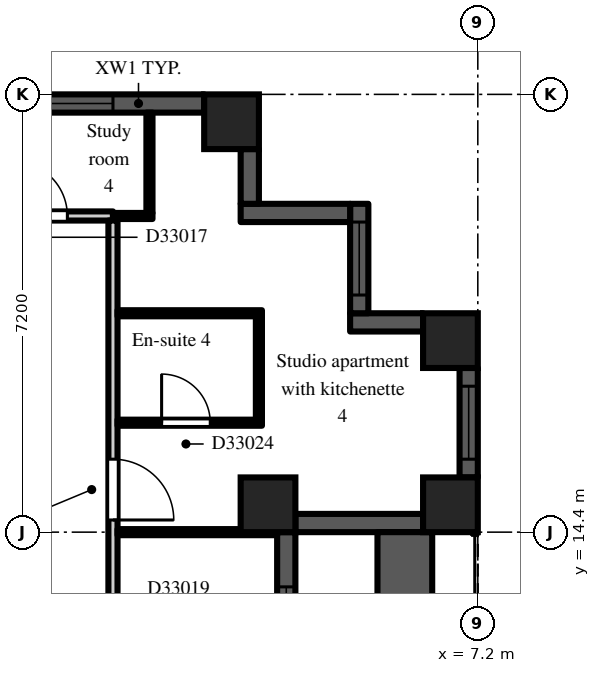
"""IFC4 building model, lengths in metres.
Left out: names, types, materials, properties, quantities, classifications, styles, units other than length and angle.
Written with IfcOpenShell. Run it as: python <this file> out.ifc"""

import sys

from ifc_helpers import new_model, si_unit, direction, frame, frame_2d, origin, origin_2d, place, context, subcontext, project, spatial, rectangle, extrude, element, fill, save


model = new_model("IFC4")
c1 = context("Model", 3, precision=1e-05, world=origin(), true_north=direction((0.0, 1.0)))
c2 = subcontext(c1, "Body", "Model", "MODEL_VIEW")
j1 = project(units=[si_unit("LENGTHUNIT", "METRE"), si_unit("PLANEANGLEUNIT", "RADIAN")], contexts=[c1])
p1 = place(None, origin())
s1 = spatial("IfcSite", under=j1, at=p1, CompositionType="ELEMENT")
p2 = place(p1, origin())
s2 = spatial("IfcBuilding", under=s1, at=p2, CompositionType="ELEMENT")
p3 = place(p2, frame((0.0, 0.0, 231.9)))
s3 = spatial("IfcBuildingStorey", under=s2, at=p3, CompositionType="ELEMENT", Elevation=231.9)
for number, where, z_axis, x_axis in (
    (1, (3.15, 21.15, 0.0), (0.0, 0.0, 1.0), (1.0, 0.0, 0.0)),
    (2, (3.75, 14.85, 0.0), (0.0, 0.0, 1.0), (1.0, 0.0, 0.0)),
    (3, (6.75, 14.85, 0.0), (0.0, 0.0, 1.0), (1.0, 0.0, 0.0)),
    (4, (6.75, 17.55, 0.0), (0.0, 0.0, 1.0), (1.0, 0.0, 0.0)),
):
    element("IfcColumn", number, at=place(p3, frame(where, z_axis=z_axis, x_axis=x_axis)), inside=s3, PredefinedType="COLUMN", context=c2, shape_type="SweptSolid", body=[
        extrude(rectangle(XDim=0.9, YDim=0.9, at=origin_2d()), origin(), (0.0, 0.0, 1.0), 3.0),
    ])
p4 = place(p3, frame((4.05, 7.2, 0.0), z_axis=(0.0, 0.0, 1.0), x_axis=(0.0, 1.0, 0.0)))
e5 = element("IfcWall", 5, at=p4, inside=s3, PredefinedType="SOLIDWALL", context=c2, shape_type="SweptSolid", body=[
    extrude(rectangle(XDim=7.2, YDim=0.3, at=frame_2d((3.6, 0.0))), origin(), (0.0, 0.0, 1.0), 2.3),
])
p5 = place(p4, frame((3.0, 0.0, 0.0)))
e6 = element("IfcOpeningElement", 6, at=p5, cuts=e5, PredefinedType="OPENING", context=c2, shape_type="SweptSolid", body=[
    extrude(rectangle(XDim=1.2, YDim=2.05, at=frame_2d((0.6, 1.025))), frame((0.0, 0.16, 0.0), z_axis=(0.0, -1.0, 0.0), x_axis=(1.0, 0.0, 0.0)), (0.0, 0.0, 1.0), 0.32),
])
p6 = place(p4, frame((0.9, 0.0, 0.2)))
e7 = element("IfcOpeningElement", 7, at=p6, cuts=e5, PredefinedType="OPENING", context=c2, shape_type="SweptSolid", body=[
    extrude(rectangle(XDim=1.8, YDim=1.85, at=frame_2d((0.9, 0.925))), frame((0.0, 0.16, 0.0), z_axis=(0.0, -1.0, 0.0), x_axis=(1.0, 0.0, 0.0)), (0.0, 0.0, 1.0), 0.32),
])
p7 = place(p4, frame((4.5, 0.0, 0.2)))
e8 = element("IfcOpeningElement", 8, at=p7, cuts=e5, PredefinedType="OPENING", context=c2, shape_type="SweptSolid", body=[
    extrude(rectangle(XDim=1.8, YDim=1.85, at=frame_2d((0.9, 0.925))), frame((0.0, 0.16, 0.0), z_axis=(0.0, -1.0, 0.0), x_axis=(1.0, 0.0, 0.0)), (0.0, 0.0, 1.0), 0.32),
])
p8 = place(p3, frame((4.2, 14.55, 0.0), z_axis=(0.0, 0.0, 1.0), x_axis=(1.0, 0.0, 0.0)))
e9 = element("IfcWall", 9, at=p8, inside=s3, PredefinedType="SOLIDWALL", context=c2, shape_type="SweptSolid", body=[
    extrude(rectangle(XDim=2.1, YDim=0.3, at=frame_2d((1.05, 0.0))), origin(), (0.0, 0.0, 1.0), 2.3),
])
p9 = place(p3, frame((7.05, 15.3, 0.0), z_axis=(0.0, 0.0, 1.0), x_axis=(0.0, 1.0, 0.0)))
e10 = element("IfcWall", 10, at=p9, inside=s3, PredefinedType="SOLIDWALL", context=c2, shape_type="SweptSolid", body=[
    extrude(rectangle(XDim=1.8, YDim=0.3, at=frame_2d((0.9, 0.0))), origin(), (0.0, 0.0, 1.0), 2.3),
])
p10 = place(p9, frame((0.3, 0.0, 0.2)))
e11 = element("IfcOpeningElement", 11, at=p10, cuts=e10, PredefinedType="OPENING", context=c2, shape_type="SweptSolid", body=[
    extrude(rectangle(XDim=1.2, YDim=1.85, at=frame_2d((0.6, 0.925))), frame((0.0, 0.16, 0.0), z_axis=(0.0, -1.0, 0.0), x_axis=(1.0, 0.0, 0.0)), (0.0, 0.0, 1.0), 0.32),
])
p11 = place(p3, frame((6.3, 17.85, 0.0), z_axis=(0.0, 0.0, 1.0), x_axis=(-1.0, 0.0, 0.0)))
e12 = element("IfcWall", 12, at=p11, inside=s3, PredefinedType="SOLIDWALL", context=c2, shape_type="SweptSolid", body=[
    extrude(rectangle(XDim=1.2, YDim=0.3, at=frame_2d((0.6, 0.0))), origin(), (0.0, 0.0, 1.0), 2.6),
])
p12 = place(p3, frame((5.25, 18.0, 0.0), z_axis=(0.0, 0.0, 1.0), x_axis=(0.0, 1.0, 0.0)))
e13 = element("IfcWall", 13, at=p12, inside=s3, PredefinedType="SOLIDWALL", context=c2, shape_type="SweptSolid", body=[
    extrude(rectangle(XDim=1.8, YDim=0.3, at=frame_2d((0.9, 0.0))), origin(), (0.0, 0.0, 1.0), 2.6),
])
p13 = place(p12, frame((0.3, 0.0, 0.2)))
e14 = element("IfcOpeningElement", 14, at=p13, cuts=e13, PredefinedType="OPENING", context=c2, shape_type="SweptSolid", body=[
    extrude(rectangle(XDim=1.2, YDim=1.85, at=frame_2d((0.6, 0.925))), frame((0.0, 0.16, 0.0), z_axis=(0.0, -1.0, 0.0), x_axis=(1.0, 0.0, 0.0)), (0.0, 0.0, 1.0), 0.32),
])
p14 = place(p3, frame((5.1, 19.65, 0.0), z_axis=(0.0, 0.0, 1.0), x_axis=(-1.0, 0.0, 0.0)))
e15 = element("IfcWall", 15, at=p14, inside=s3, PredefinedType="SOLIDWALL", context=c2, shape_type="SweptSolid", body=[
    extrude(rectangle(XDim=1.8, YDim=0.3, at=frame_2d((0.9, 0.0))), origin(), (0.0, 0.0, 1.0), 2.6),
])
p15 = place(p3, frame((3.45, 19.8, 0.0), z_axis=(0.0, 0.0, 1.0), x_axis=(0.0, 1.0, 0.0)))
e16 = element("IfcWall", 16, at=p15, inside=s3, PredefinedType="SOLIDWALL", context=c2, shape_type="SweptSolid", body=[
    extrude(rectangle(XDim=0.9, YDim=0.3, at=frame_2d((0.45, 0.0))), origin(), (0.0, 0.0, 1.0), 2.6),
])
p16 = place(p3, frame((2.7, 21.45, 0.0), z_axis=(0.0, 0.0, 1.0), x_axis=(-1.0, 0.0, 0.0)))
e17 = element("IfcWall", 17, at=p16, inside=s3, PredefinedType="SOLIDWALL", context=c2, shape_type="SweptSolid", body=[
    extrude(rectangle(XDim=5.4, YDim=0.3, at=frame_2d((2.7, 0.0))), origin(), (0.0, 0.0, 1.0), 2.3),
])
p17 = place(p16, frame((1.5, 0.0, 0.2)))
e18 = element("IfcOpeningElement", 18, at=p17, cuts=e17, PredefinedType="OPENING", context=c2, shape_type="SweptSolid", body=[
    extrude(rectangle(XDim=2.4, YDim=1.85, at=frame_2d((1.2, 0.925))), frame((0.0, 0.16, 0.0), z_axis=(0.0, -1.0, 0.0), x_axis=(1.0, 0.0, 0.0)), (0.0, 0.0, 1.0), 0.32),
])
p18 = place(p3, frame((6.0, 7.2, 0.0), z_axis=(0.0, 0.0, 1.0), x_axis=(0.0, 1.0, 0.0)))
e19 = element("IfcWall", 19, at=p18, inside=s3, PredefinedType="PARAPET", context=c2, shape_type="SweptSolid", body=[
    extrude(rectangle(XDim=7.2, YDim=0.9, at=frame_2d((3.6, 0.0))), origin(), (0.0, 0.0, 1.0), 0.8),
])
p19 = place(p3, frame((-1.2, 19.6, 0.0), z_axis=(0.0, 0.0, 1.0), x_axis=(1.0, 0.0, 0.0)))
e20 = element("IfcWall", 20, at=p19, inside=s3, PredefinedType="PARTITIONING", context=c2, shape_type="SweptSolid", body=[
    extrude(rectangle(XDim=2.4, YDim=0.15, at=frame_2d((1.2, 0.0))), origin(), (0.0, 0.0, 1.0), 2.6),
])
p20 = place(p19, frame((0.75, 0.0, 0.0)))
e21 = element("IfcOpeningElement", 21, at=p20, cuts=e20, PredefinedType="OPENING", context=c2, shape_type="SweptSolid", body=[
    extrude(rectangle(XDim=0.9, YDim=2.1, at=frame_2d((0.45, 1.05))), frame((0.0, 0.085, 0.0), z_axis=(0.0, -1.0, 0.0), x_axis=(1.0, 0.0, 0.0)), (0.0, 0.0, 1.0), 0.17),
])
p21 = place(p3, frame((1.2, 1.125, 0.0), z_axis=(0.0, 0.0, 1.0), x_axis=(0.0, 1.0, 0.0)))
e22 = element("IfcWall", 22, at=p21, inside=s3, PredefinedType="PARTITIONING", context=c2, shape_type="SweptSolid", body=[
    extrude(rectangle(XDim=18.4, YDim=0.15, at=frame_2d((9.2, 0.0))), origin(), (0.0, 0.0, 1.0), 2.6),
])
p22 = place(p21, frame((2.625, 0.0, 0.0)))
e23 = element("IfcOpeningElement", 23, at=p22, cuts=e22, PredefinedType="OPENING", context=c2, shape_type="SweptSolid", body=[
    extrude(rectangle(XDim=0.9, YDim=2.1, at=frame_2d((0.45, 1.05))), frame((0.0, 0.085, 0.0), z_axis=(0.0, -1.0, 0.0), x_axis=(1.0, 0.0, 0.0)), (0.0, 0.0, 1.0), 0.17),
])
p23 = place(p21, frame((7.025, 0.0, 0.0)))
e24 = element("IfcOpeningElement", 24, at=p23, cuts=e22, PredefinedType="OPENING", context=c2, shape_type="SweptSolid", body=[
    extrude(rectangle(XDim=0.9, YDim=2.1, at=frame_2d((0.45, 1.05))), frame((0.0, 0.085, 0.0), z_axis=(0.0, -1.0, 0.0), x_axis=(1.0, 0.0, 0.0)), (0.0, 0.0, 1.0), 0.17),
])
p24 = place(p21, frame((10.625, 0.0, 0.0)))
e25 = element("IfcOpeningElement", 25, at=p24, cuts=e22, PredefinedType="OPENING", context=c2, shape_type="SweptSolid", body=[
    extrude(rectangle(XDim=0.9, YDim=2.1, at=frame_2d((0.45, 1.05))), frame((0.0, 0.085, 0.0), z_axis=(0.0, -1.0, 0.0), x_axis=(1.0, 0.0, 0.0)), (0.0, 0.0, 1.0), 0.17),
])
p25 = place(p21, frame((13.475, 0.0, 0.0)))
e26 = element("IfcOpeningElement", 26, at=p25, cuts=e22, PredefinedType="OPENING", context=c2, shape_type="SweptSolid", body=[
    extrude(rectangle(XDim=1.0, YDim=2.1, at=frame_2d((0.5, 1.05))), frame((0.0, 0.085, 0.0), z_axis=(0.0, -1.0, 0.0), x_axis=(1.0, 0.0, 0.0)), (0.0, 0.0, 1.0), 0.17),
])
p26 = place(p3, frame((1.275, 14.4, 0.0), z_axis=(0.0, 0.0, 1.0), x_axis=(1.0, 0.0, 0.0)))
e27 = element("IfcWall", 27, at=p26, inside=s3, PredefinedType="PARTITIONING", context=c2, shape_type="SweptSolid", body=[
    extrude(rectangle(XDim=2.625, YDim=0.1, at=frame_2d((1.312, 0.0))), origin(), (0.0, 0.0, 1.0), 2.6),
])
p27 = place(p3, frame((1.275, 16.2, 0.0), z_axis=(0.0, 0.0, 1.0), x_axis=(1.0, 0.0, 0.0)))
e28 = element("IfcWall", 28, at=p27, inside=s3, PredefinedType="PARTITIONING", context=c2, shape_type="SweptSolid", body=[
    extrude(rectangle(XDim=2.375, YDim=0.1, at=frame_2d((1.188, 0.0))), origin(), (0.0, 0.0, 1.0), 2.6),
])
p28 = place(p27, frame((0.725, 0.0, 0.0)))
e29 = element("IfcOpeningElement", 29, at=p28, cuts=e28, PredefinedType="OPENING", context=c2, shape_type="SweptSolid", body=[
    extrude(rectangle(XDim=0.8, YDim=2.1, at=frame_2d((0.4, 1.05))), frame((0.0, 0.06, 0.0), z_axis=(0.0, -1.0, 0.0), x_axis=(1.0, 0.0, 0.0)), (0.0, 0.0, 1.0), 0.12),
])
p29 = place(p3, frame((1.275, 18.0, 0.0), z_axis=(0.0, 0.0, 1.0), x_axis=(1.0, 0.0, 0.0)))
e30 = element("IfcWall", 30, at=p29, inside=s3, PredefinedType="PARTITIONING", context=c2, shape_type="SweptSolid", body=[
    extrude(rectangle(XDim=2.375, YDim=0.1, at=frame_2d((1.188, 0.0))), origin(), (0.0, 0.0, 1.0), 2.6),
])
p30 = place(p3, frame((1.2, 19.6, 0.0), z_axis=(0.0, 0.0, 1.0), x_axis=(1.0, 0.0, 0.0)))
e31 = element("IfcWall", 31, at=p30, inside=s3, PredefinedType="PARTITIONING", context=c2, shape_type="SweptSolid", body=[
    extrude(rectangle(XDim=0.65, YDim=0.1, at=frame_2d((0.325, 0.0))), origin(), (0.0, 0.0, 1.0), 2.6),
])
p31 = place(p3, frame((1.8, 19.65, 0.0), z_axis=(0.0, 0.0, 1.0), x_axis=(0.0, 1.0, 0.0)))
e32 = element("IfcWall", 32, at=p31, inside=s3, PredefinedType="PARTITIONING", context=c2, shape_type="SweptSolid", body=[
    extrude(rectangle(XDim=1.65, YDim=0.1, at=frame_2d((0.825, 0.0))), origin(), (0.0, 0.0, 1.0), 2.6),
])
p32 = place(p3, frame((3.6, 16.25, 0.0), z_axis=(0.0, 0.0, 1.0), x_axis=(0.0, 1.0, 0.0)))
e33 = element("IfcWall", 33, at=p32, inside=s3, PredefinedType="PARTITIONING", context=c2, shape_type="SweptSolid", body=[
    extrude(rectangle(XDim=1.7, YDim=0.1, at=frame_2d((0.85, 0.0))), origin(), (0.0, 0.0, 1.0), 2.6),
])
p33 = place(p7, origin())
e34 = element("IfcWindow", 34, at=p33, inside=s3, PartitioningType="SINGLE_PANEL", PredefinedType="WINDOW", context=c2, shape_type="SweptSolid", body=[
    extrude(rectangle(XDim=1.8, YDim=1.85, at=frame_2d((0.9, 0.925))), frame((0.0, 0.03, 0.0), z_axis=(0.0, -1.0, 0.0), x_axis=(1.0, 0.0, 0.0)), (0.0, 0.0, 1.0), 0.06),
])
fill(e8, e34)
p34 = place(p10, origin())
e35 = element("IfcWindow", 35, at=p34, inside=s3, PartitioningType="SINGLE_PANEL", PredefinedType="WINDOW", context=c2, shape_type="SweptSolid", body=[
    extrude(rectangle(XDim=1.2, YDim=1.85, at=frame_2d((0.6, 0.925))), frame((0.0, 0.03, 0.0), z_axis=(0.0, -1.0, 0.0), x_axis=(1.0, 0.0, 0.0)), (0.0, 0.0, 1.0), 0.06),
])
fill(e11, e35)
p35 = place(p13, origin())
e36 = element("IfcWindow", 36, at=p35, inside=s3, PartitioningType="SINGLE_PANEL", PredefinedType="WINDOW", context=c2, shape_type="SweptSolid", body=[
    extrude(rectangle(XDim=1.2, YDim=1.85, at=frame_2d((0.6, 0.925))), frame((0.0, 0.03, 0.0), z_axis=(0.0, -1.0, 0.0), x_axis=(1.0, 0.0, 0.0)), (0.0, 0.0, 1.0), 0.06),
])
fill(e14, e36)
p36 = place(p17, origin())
e37 = element("IfcWindow", 37, at=p36, inside=s3, PartitioningType="SINGLE_PANEL", PredefinedType="WINDOW", context=c2, shape_type="SweptSolid", body=[
    extrude(rectangle(XDim=2.4, YDim=1.85, at=frame_2d((1.2, 0.925))), frame((0.0, 0.03, 0.0), z_axis=(0.0, -1.0, 0.0), x_axis=(1.0, 0.0, 0.0)), (0.0, 0.0, 1.0), 0.06),
])
fill(e18, e37)
p37 = place(p20, origin())
e38 = element("IfcDoor", 38, at=p37, inside=s3, OperationType="SINGLE_SWING_LEFT", PredefinedType="DOOR", context=c2, shape_type="SweptSolid", body=[
    extrude(rectangle(XDim=0.9, YDim=2.1, at=frame_2d((0.45, 1.05))), frame((0.0, 0.025, 0.0), z_axis=(0.0, -1.0, 0.0), x_axis=(1.0, 0.0, 0.0)), (0.0, 0.0, 1.0), 0.05),
])
fill(e21, e38)
p38 = place(p28, origin())
e39 = element("IfcDoor", 39, at=p38, inside=s3, OperationType="SINGLE_SWING_LEFT", PredefinedType="DOOR", context=c2, shape_type="SweptSolid", body=[
    extrude(rectangle(XDim=0.8, YDim=2.1, at=frame_2d((0.4, 1.05))), frame((0.0, 0.025, 0.0), z_axis=(0.0, -1.0, 0.0), x_axis=(1.0, 0.0, 0.0)), (0.0, 0.0, 1.0), 0.05),
])
fill(e29, e39)
p39 = place(p25, frame((1.0, 0.0, 0.0), z_axis=(0.0, 0.0, 1.0), x_axis=(-1.0, 0.0, 0.0)))
e40 = element("IfcDoor", 40, at=p39, inside=s3, OperationType="SINGLE_SWING_RIGHT", PredefinedType="DOOR", context=c2, shape_type="SweptSolid", body=[
    extrude(rectangle(XDim=1.0, YDim=2.1, at=frame_2d((0.5, 1.05))), frame((0.0, 0.025, 0.0), z_axis=(0.0, -1.0, 0.0), x_axis=(1.0, 0.0, 0.0)), (0.0, 0.0, 1.0), 0.05),
])
fill(e26, e40)
save(model, sys.argv[1])
